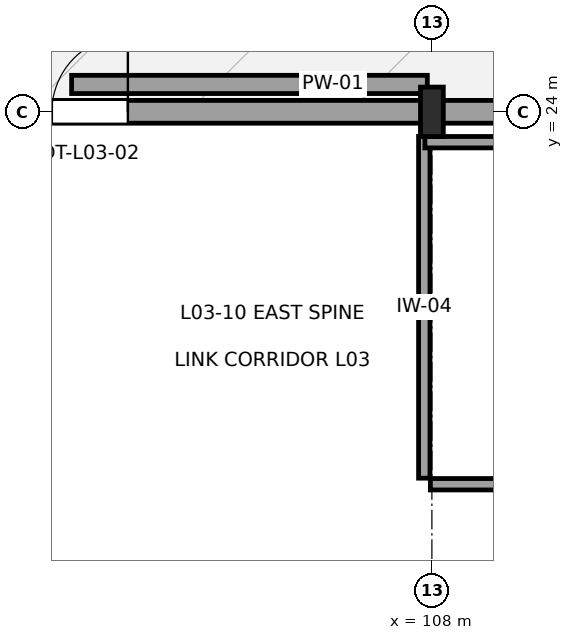
"""IFC4 building model, lengths in metres.
Left out: names, types, materials, properties, quantities, classifications, styles, units other than length and angle.
Written with IfcOpenShell. Run it as: python <this file> out.ifc"""

import sys

from ifc_helpers import new_model, si_unit, direction, frame, frame_2d, origin, origin_2d, place, context, subcontext, project, spatial, rectangle, i_section, extrude, element, fill, save


model = new_model("IFC4")
c1 = context("Model", 3, precision=1e-05, world=origin(), true_north=direction((0.0, 1.0)))
c2 = subcontext(c1, "Body", "Model", "MODEL_VIEW")
j1 = project(units=[si_unit("LENGTHUNIT", "METRE"), si_unit("PLANEANGLEUNIT", "RADIAN")], contexts=[c1])
p1 = place(None, origin())
s1 = spatial("IfcSite", under=j1, at=p1, CompositionType="ELEMENT")
p2 = place(p1, origin())
s2 = spatial("IfcBuilding", under=s1, at=p2, CompositionType="ELEMENT")
p3 = place(p2, frame((0.0, 0.0, 14.4)))
s3 = spatial("IfcBuildingStorey", under=s2, at=p3, CompositionType="ELEMENT", Elevation=14.4)
p4 = place(p3, frame((108.0, 24.0, 0.0), z_axis=(0.0, 0.0, 1.0), x_axis=(1.0, 0.0, 0.0)))
e1 = element("IfcColumn", 1, at=p4, inside=s3, PredefinedType="COLUMN", context=c2, shape_type="SweptSolid", body=[
    extrude(i_section(OverallWidth=0.3, OverallDepth=0.65, WebThickness=0.016, FlangeThickness=0.031, at=origin_2d()), origin(), (0.0, 0.0, 1.0), 4.5),
])
p5 = place(p3, frame((116.992, 24.0, 0.0), z_axis=(0.0, 0.0, 1.0), x_axis=(-1.0, 0.0, 0.0)))
e2 = element("IfcWall", 2, at=p5, inside=s3, PredefinedType="SOLIDWALL", context=c2, shape_type="SweptSolid", body=[
    extrude(rectangle(XDim=8.984, YDim=0.3, at=frame_2d((4.492, 0.0))), origin(), (0.0, 0.0, 1.0), 3.167),
])
p6 = place(p5, frame((2.045, 0.0, 0.9)))
e3 = element("IfcOpeningElement", 3, at=p6, cuts=e2, PredefinedType="OPENING", context=c2, shape_type="SweptSolid", body=[
    extrude(rectangle(XDim=1.3, YDim=1.3, at=frame_2d((0.65, 0.65))), frame((0.0, 0.165, 0.0), z_axis=(0.0, -1.0, 0.0), x_axis=(1.0, 0.0, 0.0)), (0.0, 0.0, 1.0), 0.33),
])
p7 = place(p5, frame((5.639, 0.0, 0.9)))
e4 = element("IfcOpeningElement", 4, at=p7, cuts=e2, PredefinedType="OPENING", context=c2, shape_type="SweptSolid", body=[
    extrude(rectangle(XDim=1.3, YDim=1.3, at=frame_2d((0.65, 0.65))), frame((0.0, 0.165, 0.0), z_axis=(0.0, -1.0, 0.0), x_axis=(1.0, 0.0, 0.0)), (0.0, 0.0, 1.0), 0.33),
])
p8 = place(p3, frame((107.992, 24.0, 0.0), z_axis=(0.0, 0.0, 1.0), x_axis=(-1.0, 0.0, 0.0)))
e5 = element("IfcWall", 5, at=p8, inside=s3, PredefinedType="SOLIDWALL", context=c2, shape_type="SweptSolid", body=[
    extrude(rectangle(XDim=8.619, YDim=0.3, at=frame_2d((4.31, 0.0))), origin(), (0.0, 0.0, 1.0), 3.275),
])
p9 = place(p8, frame((3.992, 0.0, 0.0)))
e6 = element("IfcOpeningElement", 6, at=p9, cuts=e5, PredefinedType="OPENING", context=c2, shape_type="SweptSolid", body=[
    extrude(rectangle(XDim=1.0, YDim=2.2, at=frame_2d((0.5, 1.1))), frame((0.0, 0.165, 0.0), z_axis=(0.0, -1.0, 0.0), x_axis=(1.0, 0.0, 0.0)), (0.0, 0.0, 1.0), 0.33),
])
p10 = place(p3, frame((103.26, 24.36, 0.0), z_axis=(0.0, 0.0, 1.0), x_axis=(1.0, 0.0, 0.0)))
e7 = element("IfcWall", 7, at=p10, inside=s3, PredefinedType="PARAPET", context=c2, shape_type="SweptSolid", body=[
    extrude(rectangle(XDim=4.68, YDim=0.24, at=frame_2d((2.34, 0.0))), origin(), (0.0, 0.0, 1.0), 0.8),
])
p11 = place(p3, frame((147.455, 19.1, 0.0), z_axis=(0.0, 0.0, 1.0), x_axis=(-1.0, 0.0, 0.0)))
e8 = element("IfcWall", 8, at=p11, inside=s3, PredefinedType="PARTITIONING", context=c2, shape_type="SweptSolid", body=[
    extrude(rectangle(XDim=39.475, YDim=0.15, at=frame_2d((19.738, 0.0))), origin(), (0.0, 0.0, 1.0), 4.14),
])
p12 = place(p11, frame((19.213, 0.0, 0.0)))
e9 = element("IfcOpeningElement", 9, at=p12, cuts=e8, PredefinedType="OPENING", context=c2, shape_type="SweptSolid", body=[
    extrude(rectangle(XDim=1.05, YDim=2.25, at=frame_2d((0.525, 1.125))), frame((0.0, 0.09, 0.0), z_axis=(0.0, -1.0, 0.0), x_axis=(1.0, 0.0, 0.0)), (0.0, 0.0, 1.0), 0.18),
])
p13 = place(p3, frame((107.9, 19.18, 0.0), z_axis=(0.0, 0.0, 1.0), x_axis=(0.0, 1.0, 0.0)))
e10 = element("IfcWall", 10, at=p13, inside=s3, PredefinedType="PARTITIONING", context=c2, shape_type="SweptSolid", body=[
    extrude(rectangle(XDim=4.497, YDim=0.15, at=frame_2d((2.249, 0.0))), origin(), (0.0, 0.0, 1.0), 3.625),
])
p14 = place(p3, frame((107.908, 23.6, 0.0), z_axis=(0.0, 0.0, 1.0), x_axis=(1.0, 0.0, 0.0)))
e11 = element("IfcWall", 11, at=p14, inside=s3, PredefinedType="PARTITIONING", context=c2, shape_type="SweptSolid", body=[
    extrude(rectangle(XDim=39.122, YDim=0.15, at=frame_2d((19.561, 0.0))), origin(), (0.0, 0.0, 1.0), 4.14),
])
p15 = place(p9, frame((1.0, 0.0, 0.0), z_axis=(0.0, 0.0, 1.0), x_axis=(-1.0, 0.0, 0.0)))
e12 = element("IfcDoor", 12, at=p15, inside=s3, OperationType="SINGLE_SWING_LEFT", PredefinedType="DOOR", context=c2, shape_type="SweptSolid", body=[
    extrude(rectangle(XDim=1.0, YDim=2.2, at=frame_2d((0.5, 1.1))), frame((0.0, 0.025, 0.0), z_axis=(0.0, -1.0, 0.0), x_axis=(1.0, 0.0, 0.0)), (0.0, 0.0, 1.0), 0.05),
])
fill(e6, e12)
save(model, sys.argv[1])
